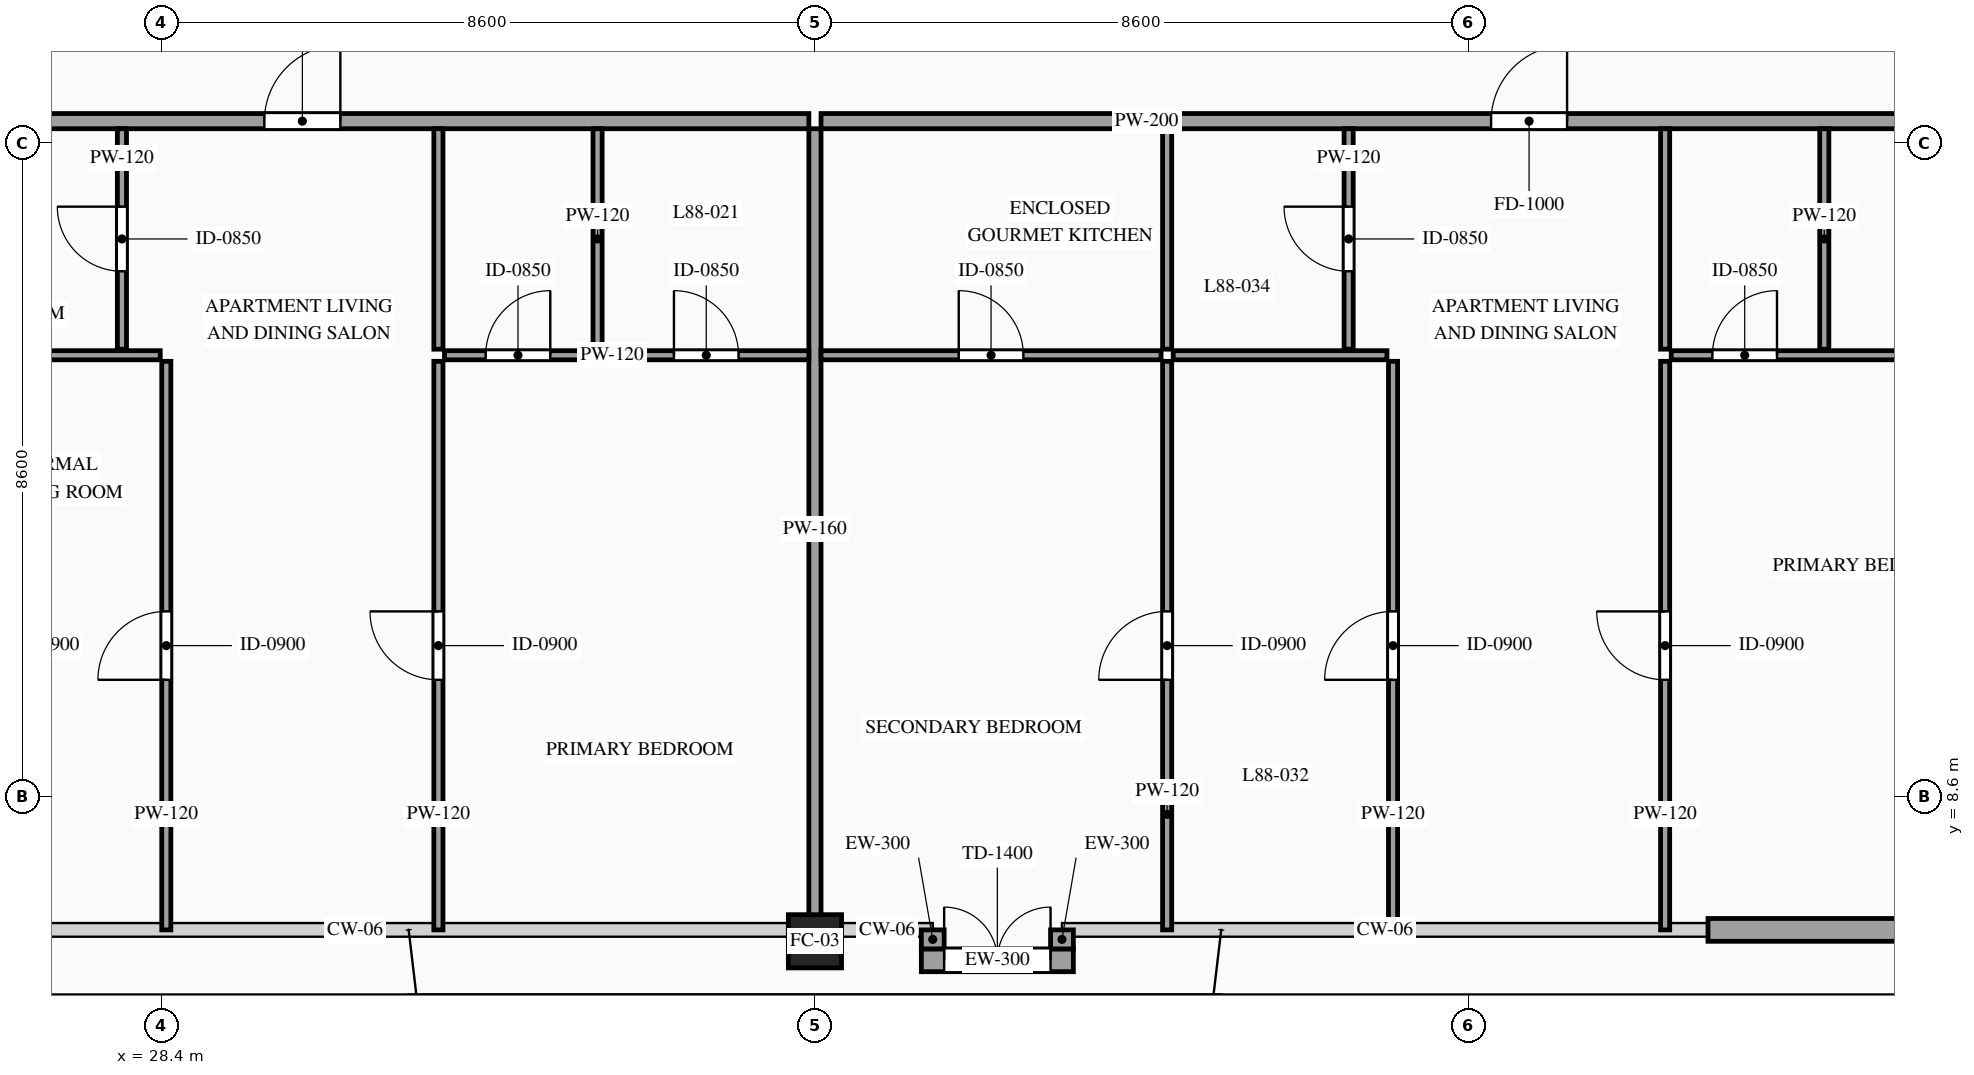
"""IFC4 building model, lengths in metres.
Left out: names, types, materials, properties, quantities, classifications, styles, units other than length and angle.
Written with IfcOpenShell. Run it as: python <this file> out.ifc"""

import sys

from ifc_helpers import new_model, si_unit, direction, frame, frame_2d, origin, origin_2d, place, context, subcontext, project, spatial, rectangle, hollow_rectangle, extrude, source, transform, mapped, element, fill, save


model = new_model("IFC4")
c1 = context("Model", 3, precision=1e-05, world=origin(), true_north=direction((0.0, 1.0)))
c2 = subcontext(c1, "Body", "Model", "MODEL_VIEW")
j1 = project(units=[si_unit("LENGTHUNIT", "METRE"), si_unit("PLANEANGLEUNIT", "RADIAN")], contexts=[c1])
p1 = place(None, origin())
s1 = spatial("IfcSite", under=j1, at=p1, CompositionType="ELEMENT")
p2 = place(p1, origin())
s2 = spatial("IfcBuilding", under=s1, at=p2, CompositionType="ELEMENT")
p3 = place(p2, frame((0.0, 0.0, 328.7)))
s3 = spatial("IfcBuildingStorey", under=s2, at=p3, CompositionType="ELEMENT", Elevation=328.7)
m1 = source(origin(), c2, "Body", "SweptSolid", [
    extrude(hollow_rectangle(XDim=0.7, YDim=0.7, WallThickness=0.032, at=origin_2d()), origin(), (0.0, 0.0, 1.0), 3.5),
])
p4 = place(p3, frame((37.0, 6.7, 0.0), z_axis=(0.0, 0.0, 1.0), x_axis=(1.0, 0.0, 0.0)))
e1 = element("IfcColumn", 1, at=p4, inside=s3, PredefinedType="COLUMN", context=c2, shape_type="MappedRepresentation", body=[
    mapped(m1, transform((0.0, 0.0, 0.0), scale=1.0)),
])
m2 = source(origin(), c2, "Body", "SweptSolid", [
    extrude(rectangle(XDim=3.25, YDim=0.3, at=frame_2d((1.625, 0.0))), origin(), (0.0, 0.0, 1.0), 2.885),
])
p5 = place(p3, frame((48.75, 6.85, 0.0), z_axis=(0.0, 0.0, 1.0), x_axis=(1.0, 0.0, 0.0)))
e2 = element("IfcWall", 2, at=p5, inside=s3, PredefinedType="SOLIDWALL", context=c2, shape_type="MappedRepresentation", body=[
    mapped(m2, transform((0.0, 0.0, 0.0), scale=1.0)),
])
p6 = place(p3, frame((38.4, 6.45, 0.0), z_axis=(0.0, 0.0, 1.0), x_axis=(1.0, 0.0, 0.0)))
e3 = element("IfcWall", 3, at=p6, inside=s3, PredefinedType="SOLIDWALL", context=c2, shape_type="SweptSolid", body=[
    extrude(rectangle(XDim=2.0, YDim=0.3, at=frame_2d((1.0, 0.0))), origin(), (0.0, 0.0, 1.0), 2.885),
])
p7 = place(p6, frame((0.3, 0.0, 0.0)))
e4 = element("IfcOpeningElement", 4, at=p7, cuts=e3, PredefinedType="OPENING", context=c2, shape_type="SweptSolid", body=[
    extrude(rectangle(XDim=1.4, YDim=2.3, at=frame_2d((0.7, 1.15))), frame((0.0, 0.165, 0.0), z_axis=(0.0, -1.0, 0.0), x_axis=(1.0, 0.0, 0.0)), (0.0, 0.0, 1.0), 0.33),
])
m3 = source(origin(), c2, "Body", "SweptSolid", [
    extrude(rectangle(XDim=0.25, YDim=0.3, at=frame_2d((0.125, 0.0))), origin(), (0.0, 0.0, 1.0), 3.28),
])
for number, where, z_axis, x_axis in (
    (5, (38.55, 6.85, 0.0), (0.0, 0.0, 1.0), (0.0, -1.0, 0.0)),
    (6, (40.25, 6.6, 0.0), (0.0, 0.0, 1.0), (0.0, 1.0, 0.0)),
):
    element("IfcWall", number, at=place(p3, frame(where, z_axis=z_axis, x_axis=x_axis)), inside=s3, PredefinedType="SOLIDWALL", context=c2, shape_type="MappedRepresentation", body=[
        mapped(m3, transform((0.0, 0.0, 0.0), scale=1.0)),
    ])
p8 = place(p3, frame((20.94, 17.49, 0.0), z_axis=(0.0, 0.0, 1.0), x_axis=(1.0, 0.0, 0.0)))
e7 = element("IfcWall", 7, at=p8, inside=s3, PredefinedType="PARTITIONING", context=c2, shape_type="SweptSolid", body=[
    extrude(rectangle(XDim=15.98, YDim=0.2, at=frame_2d((7.99, 0.0))), origin(), (0.0, 0.0, 1.0), 3.28),
])
p9 = place(p8, frame((8.816, 0.0, 0.0)))
e8 = element("IfcOpeningElement", 8, at=p9, cuts=e7, PredefinedType="OPENING", context=c2, shape_type="SweptSolid", body=[
    extrude(rectangle(XDim=1.0, YDim=2.2, at=frame_2d((0.5, 1.1))), frame((0.0, 0.115, 0.0), z_axis=(0.0, -1.0, 0.0), x_axis=(1.0, 0.0, 0.0)), (0.0, 0.0, 1.0), 0.23),
])
m4 = source(origin(), c2, "Body", "SweptSolid", [
    extrude(rectangle(XDim=10.54, YDim=0.16, at=frame_2d((5.27, 0.0))), origin(), (0.0, 0.0, 1.0), 2.787),
])
p10 = place(p3, frame((37.0, 6.85, 0.0), z_axis=(0.0, 0.0, 1.0), x_axis=(0.0, 1.0, 0.0)))
e9 = element("IfcWall", 9, at=p10, inside=s3, PredefinedType="PARTITIONING", context=c2, shape_type="MappedRepresentation", body=[
    mapped(m4, transform((0.0, 0.0, 0.0), scale=1.0)),
])
p11 = place(p3, frame((27.882, 14.49, 0.0), z_axis=(0.0, 0.0, 1.0), x_axis=(0.0, 1.0, 0.0)))
e10 = element("IfcWall", 10, at=p11, inside=s3, PredefinedType="PARTITIONING", context=c2, shape_type="SweptSolid", body=[
    extrude(rectangle(XDim=2.9, YDim=0.12, at=frame_2d((1.45, 0.0))), origin(), (0.0, 0.0, 1.0), 3.28),
])
p12 = place(p11, frame((1.025, 0.0, 0.0)))
e11 = element("IfcOpeningElement", 11, at=p12, cuts=e10, PredefinedType="OPENING", context=c2, shape_type="SweptSolid", body=[
    extrude(rectangle(XDim=0.85, YDim=2.1, at=frame_2d((0.425, 1.05))), frame((0.0, 0.075, 0.0), z_axis=(0.0, -1.0, 0.0), x_axis=(1.0, 0.0, 0.0)), (0.0, 0.0, 1.0), 0.15),
])
m5 = source(origin(), c2, "Body", "SweptSolid", [
    extrude(rectangle(XDim=2.9, YDim=0.12, at=frame_2d((1.45, 0.0))), origin(), (0.0, 0.0, 1.0), 3.28),
])
for number, where, z_axis, x_axis in (
    (12, (34.14, 14.49, 0.0), (0.0, 0.0, 1.0), (0.0, 1.0, 0.0)),
    (13, (32.046, 14.49, 0.0), (0.0, 0.0, 1.0), (0.0, 1.0, 0.0)),
):
    element("IfcWall", number, at=place(p3, frame(where, z_axis=z_axis, x_axis=x_axis)), inside=s3, PredefinedType="PARTITIONING", context=c2, shape_type="MappedRepresentation", body=[
        mapped(m5, transform((0.0, 0.0, 0.0), scale=1.0)),
    ])
p13 = place(p3, frame((32.126, 14.41, 0.0), z_axis=(0.0, 0.0, 1.0), x_axis=(1.0, 0.0, 0.0)))
e14 = element("IfcWall", 14, at=p13, inside=s3, PredefinedType="PARTITIONING", context=c2, shape_type="SweptSolid", body=[
    extrude(rectangle(XDim=4.794, YDim=0.12, at=frame_2d((2.397, 0.0))), origin(), (0.0, 0.0, 1.0), 3.28),
])
p14 = place(p13, frame((3.019, 0.0, 0.0)))
e15 = element("IfcOpeningElement", 15, at=p14, cuts=e14, PredefinedType="OPENING", context=c2, shape_type="SweptSolid", body=[
    extrude(rectangle(XDim=0.85, YDim=2.1, at=frame_2d((0.425, 1.05))), frame((0.0, 0.075, 0.0), z_axis=(0.0, -1.0, 0.0), x_axis=(1.0, 0.0, 0.0)), (0.0, 0.0, 1.0), 0.15),
])
p15 = place(p13, frame((0.542, 0.0, 0.0)))
e16 = element("IfcOpeningElement", 16, at=p15, cuts=e14, PredefinedType="OPENING", context=c2, shape_type="SweptSolid", body=[
    extrude(rectangle(XDim=0.85, YDim=2.1, at=frame_2d((0.425, 1.05))), frame((0.0, 0.075, 0.0), z_axis=(0.0, -1.0, 0.0), x_axis=(1.0, 0.0, 0.0)), (0.0, 0.0, 1.0), 0.15),
])
p16 = place(p3, frame((32.046, 6.85, 0.0), z_axis=(0.0, 0.0, 1.0), x_axis=(0.0, 1.0, 0.0)))
e17 = element("IfcWall", 17, at=p16, inside=s3, PredefinedType="PARTITIONING", context=c2, shape_type="SweptSolid", body=[
    extrude(rectangle(XDim=7.48, YDim=0.12, at=frame_2d((3.74, 0.0))), origin(), (0.0, 0.0, 1.0), 3.28),
])
p17 = place(p16, frame((3.29, 0.0, 0.0)))
e18 = element("IfcOpeningElement", 18, at=p17, cuts=e17, PredefinedType="OPENING", context=c2, shape_type="SweptSolid", body=[
    extrude(rectangle(XDim=0.9, YDim=2.15, at=frame_2d((0.45, 1.075))), frame((0.0, 0.075, 0.0), z_axis=(0.0, -1.0, 0.0), x_axis=(1.0, 0.0, 0.0)), (0.0, 0.0, 1.0), 0.15),
])
m6 = source(origin(), c2, "Body", "SweptSolid", [
    extrude(rectangle(XDim=2.812, YDim=0.12, at=frame_2d((1.406, 0.0))), origin(), (0.0, 0.0, 1.0), 3.28),
])
p18 = place(p3, frame((25.574, 14.41, 0.0), z_axis=(0.0, 0.0, 1.0), x_axis=(1.0, 0.0, 0.0)))
e19 = element("IfcWall", 19, at=p18, inside=s3, PredefinedType="PARTITIONING", context=c2, shape_type="MappedRepresentation", body=[
    mapped(m6, transform((0.0, 0.0, 0.0), scale=1.0)),
])
p19 = place(p3, frame((28.466, 6.85, 0.0), z_axis=(0.0, 0.0, 1.0), x_axis=(0.0, 1.0, 0.0)))
e20 = element("IfcWall", 20, at=p19, inside=s3, PredefinedType="PARTITIONING", context=c2, shape_type="SweptSolid", body=[
    extrude(rectangle(XDim=7.48, YDim=0.12, at=frame_2d((3.74, 0.0))), origin(), (0.0, 0.0, 1.0), 3.28),
])
p20 = place(p19, frame((3.29, 0.0, 0.0)))
e21 = element("IfcOpeningElement", 21, at=p20, cuts=e20, PredefinedType="OPENING", context=c2, shape_type="SweptSolid", body=[
    extrude(rectangle(XDim=0.9, YDim=2.15, at=frame_2d((0.45, 1.075))), frame((0.0, 0.075, 0.0), z_axis=(0.0, -1.0, 0.0), x_axis=(1.0, 0.0, 0.0)), (0.0, 0.0, 1.0), 0.15),
])
p21 = place(p3, frame((37.08, 17.49, 0.0), z_axis=(0.0, 0.0, 1.0), x_axis=(1.0, 0.0, 0.0)))
e22 = element("IfcWall", 22, at=p21, inside=s3, PredefinedType="PARTITIONING", context=c2, shape_type="SweptSolid", body=[
    extrude(rectangle(XDim=15.98, YDim=0.2, at=frame_2d((7.99, 0.0))), origin(), (0.0, 0.0, 1.0), 3.28),
])
p22 = place(p21, frame((8.816, 0.0, 0.0)))
e23 = element("IfcOpeningElement", 23, at=p22, cuts=e22, PredefinedType="OPENING", context=c2, shape_type="SweptSolid", body=[
    extrude(rectangle(XDim=1.0, YDim=2.2, at=frame_2d((0.5, 1.1))), frame((0.0, 0.115, 0.0), z_axis=(0.0, -1.0, 0.0), x_axis=(1.0, 0.0, 0.0)), (0.0, 0.0, 1.0), 0.23),
])
p23 = place(p3, frame((37.08, 14.41, 0.0), z_axis=(0.0, 0.0, 1.0), x_axis=(1.0, 0.0, 0.0)))
e24 = element("IfcWall", 24, at=p23, inside=s3, PredefinedType="PARTITIONING", context=c2, shape_type="SweptSolid", body=[
    extrude(rectangle(XDim=4.474, YDim=0.12, at=frame_2d((2.237, 0.0))), origin(), (0.0, 0.0, 1.0), 3.28),
])
p24 = place(p23, frame((1.812, 0.0, 0.0)))
e25 = element("IfcOpeningElement", 25, at=p24, cuts=e24, PredefinedType="OPENING", context=c2, shape_type="SweptSolid", body=[
    extrude(rectangle(XDim=0.85, YDim=2.1, at=frame_2d((0.425, 1.05))), frame((0.0, 0.075, 0.0), z_axis=(0.0, -1.0, 0.0), x_axis=(1.0, 0.0, 0.0)), (0.0, 0.0, 1.0), 0.15),
])
p25 = place(p3, frame((41.634, 14.49, 0.0), z_axis=(0.0, 0.0, 1.0), x_axis=(0.0, 1.0, 0.0)))
e26 = element("IfcWall", 26, at=p25, inside=s3, PredefinedType="PARTITIONING", context=c2, shape_type="MappedRepresentation", body=[
    mapped(m5, transform((0.0, 0.0, 0.0), scale=1.0)),
])
p26 = place(p3, frame((44.022, 14.49, 0.0), z_axis=(0.0, 0.0, 1.0), x_axis=(0.0, 1.0, 0.0)))
e27 = element("IfcWall", 27, at=p26, inside=s3, PredefinedType="PARTITIONING", context=c2, shape_type="SweptSolid", body=[
    extrude(rectangle(XDim=2.9, YDim=0.12, at=frame_2d((1.45, 0.0))), origin(), (0.0, 0.0, 1.0), 3.28),
])
p27 = place(p26, frame((1.025, 0.0, 0.0)))
e28 = element("IfcOpeningElement", 28, at=p27, cuts=e27, PredefinedType="OPENING", context=c2, shape_type="SweptSolid", body=[
    extrude(rectangle(XDim=0.85, YDim=2.1, at=frame_2d((0.425, 1.05))), frame((0.0, 0.075, 0.0), z_axis=(0.0, -1.0, 0.0), x_axis=(1.0, 0.0, 0.0)), (0.0, 0.0, 1.0), 0.15),
])
m7 = source(origin(), c2, "Body", "SweptSolid", [
    extrude(rectangle(XDim=2.9, YDim=0.12, at=frame_2d((1.45, 0.0))), origin(), (0.0, 0.0, 1.0), 2.825),
])
p28 = place(p3, frame((50.28, 14.49, 0.0), z_axis=(0.0, 0.0, 1.0), x_axis=(0.0, 1.0, 0.0)))
e29 = element("IfcWall", 29, at=p28, inside=s3, PredefinedType="PARTITIONING", context=c2, shape_type="MappedRepresentation", body=[
    mapped(m7, transform((0.0, 0.0, 0.0), scale=1.0)),
])
p29 = place(p3, frame((48.186, 14.49, 0.0), z_axis=(0.0, 0.0, 1.0), x_axis=(0.0, 1.0, 0.0)))
e30 = element("IfcWall", 30, at=p29, inside=s3, PredefinedType="PARTITIONING", context=c2, shape_type="MappedRepresentation", body=[
    mapped(m5, transform((0.0, 0.0, 0.0), scale=1.0)),
])
p30 = place(p3, frame((41.634, 6.85, 0.0), z_axis=(0.0, 0.0, 1.0), x_axis=(0.0, 1.0, 0.0)))
e31 = element("IfcWall", 31, at=p30, inside=s3, PredefinedType="PARTITIONING", context=c2, shape_type="SweptSolid", body=[
    extrude(rectangle(XDim=7.48, YDim=0.12, at=frame_2d((3.74, 0.0))), origin(), (0.0, 0.0, 1.0), 3.28),
])
p31 = place(p30, frame((3.29, 0.0, 0.0)))
e32 = element("IfcOpeningElement", 32, at=p31, cuts=e31, PredefinedType="OPENING", context=c2, shape_type="SweptSolid", body=[
    extrude(rectangle(XDim=0.9, YDim=2.15, at=frame_2d((0.45, 1.075))), frame((0.0, 0.075, 0.0), z_axis=(0.0, -1.0, 0.0), x_axis=(1.0, 0.0, 0.0)), (0.0, 0.0, 1.0), 0.15),
])
p32 = place(p3, frame((48.266, 14.41, 0.0), z_axis=(0.0, 0.0, 1.0), x_axis=(1.0, 0.0, 0.0)))
e33 = element("IfcWall", 33, at=p32, inside=s3, PredefinedType="PARTITIONING", context=c2, shape_type="SweptSolid", body=[
    extrude(rectangle(XDim=4.794, YDim=0.12, at=frame_2d((2.397, 0.0))), origin(), (0.0, 0.0, 1.0), 3.28),
])
p33 = place(p32, frame((3.019, 0.0, 0.0)))
e34 = element("IfcOpeningElement", 34, at=p33, cuts=e33, PredefinedType="OPENING", context=c2, shape_type="SweptSolid", body=[
    extrude(rectangle(XDim=0.85, YDim=2.1, at=frame_2d((0.425, 1.05))), frame((0.0, 0.075, 0.0), z_axis=(0.0, -1.0, 0.0), x_axis=(1.0, 0.0, 0.0)), (0.0, 0.0, 1.0), 0.15),
])
p34 = place(p32, frame((0.542, 0.0, 0.0)))
e35 = element("IfcOpeningElement", 35, at=p34, cuts=e33, PredefinedType="OPENING", context=c2, shape_type="SweptSolid", body=[
    extrude(rectangle(XDim=0.85, YDim=2.1, at=frame_2d((0.425, 1.05))), frame((0.0, 0.075, 0.0), z_axis=(0.0, -1.0, 0.0), x_axis=(1.0, 0.0, 0.0)), (0.0, 0.0, 1.0), 0.15),
])
p35 = place(p3, frame((48.186, 6.85, 0.0), z_axis=(0.0, 0.0, 1.0), x_axis=(0.0, 1.0, 0.0)))
e36 = element("IfcWall", 36, at=p35, inside=s3, PredefinedType="PARTITIONING", context=c2, shape_type="SweptSolid", body=[
    extrude(rectangle(XDim=7.48, YDim=0.12, at=frame_2d((3.74, 0.0))), origin(), (0.0, 0.0, 1.0), 3.28),
])
p36 = place(p35, frame((3.29, 0.0, 0.0)))
e37 = element("IfcOpeningElement", 37, at=p36, cuts=e36, PredefinedType="OPENING", context=c2, shape_type="SweptSolid", body=[
    extrude(rectangle(XDim=0.9, YDim=2.15, at=frame_2d((0.45, 1.075))), frame((0.0, 0.075, 0.0), z_axis=(0.0, -1.0, 0.0), x_axis=(1.0, 0.0, 0.0)), (0.0, 0.0, 1.0), 0.15),
])
m8 = source(origin(), c2, "Body", "SweptSolid", [
    extrude(rectangle(XDim=2.812, YDim=0.12, at=frame_2d((1.406, 0.0))), origin(), (0.0, 0.0, 1.0), 3.28),
])
p37 = place(p3, frame((41.714, 14.41, 0.0), z_axis=(0.0, 0.0, 1.0), x_axis=(1.0, 0.0, 0.0)))
e38 = element("IfcWall", 38, at=p37, inside=s3, PredefinedType="PARTITIONING", context=c2, shape_type="MappedRepresentation", body=[
    mapped(m8, transform((0.0, 0.0, 0.0), scale=1.0)),
])
p38 = place(p3, frame((44.606, 6.85, 0.0), z_axis=(0.0, 0.0, 1.0), x_axis=(0.0, 1.0, 0.0)))
e39 = element("IfcWall", 39, at=p38, inside=s3, PredefinedType="PARTITIONING", context=c2, shape_type="SweptSolid", body=[
    extrude(rectangle(XDim=7.48, YDim=0.12, at=frame_2d((3.74, 0.0))), origin(), (0.0, 0.0, 1.0), 3.28),
])
p39 = place(p38, frame((3.29, 0.0, 0.0)))
e40 = element("IfcOpeningElement", 40, at=p39, cuts=e39, PredefinedType="OPENING", context=c2, shape_type="SweptSolid", body=[
    extrude(rectangle(XDim=0.9, YDim=2.15, at=frame_2d((0.45, 1.075))), frame((0.0, 0.075, 0.0), z_axis=(0.0, -1.0, 0.0), x_axis=(1.0, 0.0, 0.0)), (0.0, 0.0, 1.0), 0.15),
])
m9 = source(origin(), c2, "Body", "SweptSolid", [
    extrude(rectangle(XDim=1.4, YDim=2.3, at=frame_2d((0.7, 1.15))), frame((0.0, 0.025, 0.0), z_axis=(0.0, -1.0, 0.0), x_axis=(1.0, 0.0, 0.0)), (0.0, 0.0, 1.0), 0.05),
])
p40 = place(p7, origin())
e41 = element("IfcDoor", 41, at=p40, inside=s3, OperationType="DOUBLE_DOOR_SINGLE_SWING", PredefinedType="DOOR", context=c2, shape_type="MappedRepresentation", body=[
    mapped(m9, transform((0.0, 0.0, 0.0), scale=1.0)),
])
fill(e4, e41)
m10 = source(origin(), c2, "Body", "SweptSolid", [
    extrude(rectangle(XDim=1.0, YDim=2.2, at=frame_2d((0.5, 1.1))), frame((0.0, 0.025, 0.0), z_axis=(0.0, -1.0, 0.0), x_axis=(1.0, 0.0, 0.0)), (0.0, 0.0, 1.0), 0.05),
])
p41 = place(p9, origin())
e42 = element("IfcDoor", 42, at=p41, inside=s3, OperationType="SINGLE_SWING_RIGHT", PredefinedType="DOOR", context=c2, shape_type="MappedRepresentation", body=[
    mapped(m10, transform((0.0, 0.0, 0.0), scale=1.0)),
])
fill(e8, e42)
m11 = source(origin(), c2, "Body", "SweptSolid", [
    extrude(rectangle(XDim=0.85, YDim=2.1, at=frame_2d((0.425, 1.05))), frame((0.0, 0.025, 0.0), z_axis=(0.0, -1.0, 0.0), x_axis=(1.0, 0.0, 0.0)), (0.0, 0.0, 1.0), 0.05),
])
p42 = place(p12, origin())
e43 = element("IfcDoor", 43, at=p42, inside=s3, OperationType="SINGLE_SWING_RIGHT", PredefinedType="DOOR", context=c2, shape_type="MappedRepresentation", body=[
    mapped(m11, transform((0.0, 0.0, 0.0), scale=1.0)),
])
fill(e11, e43)
p43 = place(p14, origin())
e44 = element("IfcDoor", 44, at=p43, inside=s3, OperationType="SINGLE_SWING_LEFT", PredefinedType="DOOR", context=c2, shape_type="MappedRepresentation", body=[
    mapped(m11, transform((0.0, 0.0, 0.0), scale=1.0)),
])
fill(e15, e44)
p44 = place(p15, origin())
e45 = element("IfcDoor", 45, at=p44, inside=s3, OperationType="SINGLE_SWING_RIGHT", PredefinedType="DOOR", context=c2, shape_type="MappedRepresentation", body=[
    mapped(m11, transform((0.0, 0.0, 0.0), scale=1.0)),
])
fill(e16, e45)
m12 = source(origin(), c2, "Body", "SweptSolid", [
    extrude(rectangle(XDim=0.9, YDim=2.15, at=frame_2d((0.45, 1.075))), frame((0.0, 0.025, 0.0), z_axis=(0.0, -1.0, 0.0), x_axis=(1.0, 0.0, 0.0)), (0.0, 0.0, 1.0), 0.05),
])
p45 = place(p17, origin())
e46 = element("IfcDoor", 46, at=p45, inside=s3, OperationType="SINGLE_SWING_RIGHT", PredefinedType="DOOR", context=c2, shape_type="MappedRepresentation", body=[
    mapped(m12, transform((0.0, 0.0, 0.0), scale=1.0)),
])
fill(e18, e46)
p46 = place(p20, origin())
e47 = element("IfcDoor", 47, at=p46, inside=s3, OperationType="SINGLE_SWING_LEFT", PredefinedType="DOOR", context=c2, shape_type="MappedRepresentation", body=[
    mapped(m12, transform((0.0, 0.0, 0.0), scale=1.0)),
])
fill(e21, e47)
p47 = place(p22, origin())
e48 = element("IfcDoor", 48, at=p47, inside=s3, OperationType="SINGLE_SWING_RIGHT", PredefinedType="DOOR", context=c2, shape_type="MappedRepresentation", body=[
    mapped(m10, transform((0.0, 0.0, 0.0), scale=1.0)),
])
fill(e23, e48)
p48 = place(p24, origin())
e49 = element("IfcDoor", 49, at=p48, inside=s3, OperationType="SINGLE_SWING_LEFT", PredefinedType="DOOR", context=c2, shape_type="MappedRepresentation", body=[
    mapped(m11, transform((0.0, 0.0, 0.0), scale=1.0)),
])
fill(e25, e49)
p49 = place(p27, origin())
e50 = element("IfcDoor", 50, at=p49, inside=s3, OperationType="SINGLE_SWING_RIGHT", PredefinedType="DOOR", context=c2, shape_type="MappedRepresentation", body=[
    mapped(m11, transform((0.0, 0.0, 0.0), scale=1.0)),
])
fill(e28, e50)
p50 = place(p34, origin())
e51 = element("IfcDoor", 51, at=p50, inside=s3, OperationType="SINGLE_SWING_RIGHT", PredefinedType="DOOR", context=c2, shape_type="MappedRepresentation", body=[
    mapped(m11, transform((0.0, 0.0, 0.0), scale=1.0)),
])
fill(e35, e51)
p51 = place(p31, origin())
e52 = element("IfcDoor", 52, at=p51, inside=s3, OperationType="SINGLE_SWING_LEFT", PredefinedType="DOOR", context=c2, shape_type="MappedRepresentation", body=[
    mapped(m12, transform((0.0, 0.0, 0.0), scale=1.0)),
])
fill(e32, e52)
p52 = place(p36, origin())
e53 = element("IfcDoor", 53, at=p52, inside=s3, OperationType="SINGLE_SWING_RIGHT", PredefinedType="DOOR", context=c2, shape_type="MappedRepresentation", body=[
    mapped(m12, transform((0.0, 0.0, 0.0), scale=1.0)),
])
fill(e37, e53)
p53 = place(p39, origin())
e54 = element("IfcDoor", 54, at=p53, inside=s3, OperationType="SINGLE_SWING_LEFT", PredefinedType="DOOR", context=c2, shape_type="MappedRepresentation", body=[
    mapped(m12, transform((0.0, 0.0, 0.0), scale=1.0)),
])
fill(e40, e54)
save(model, sys.argv[1])
